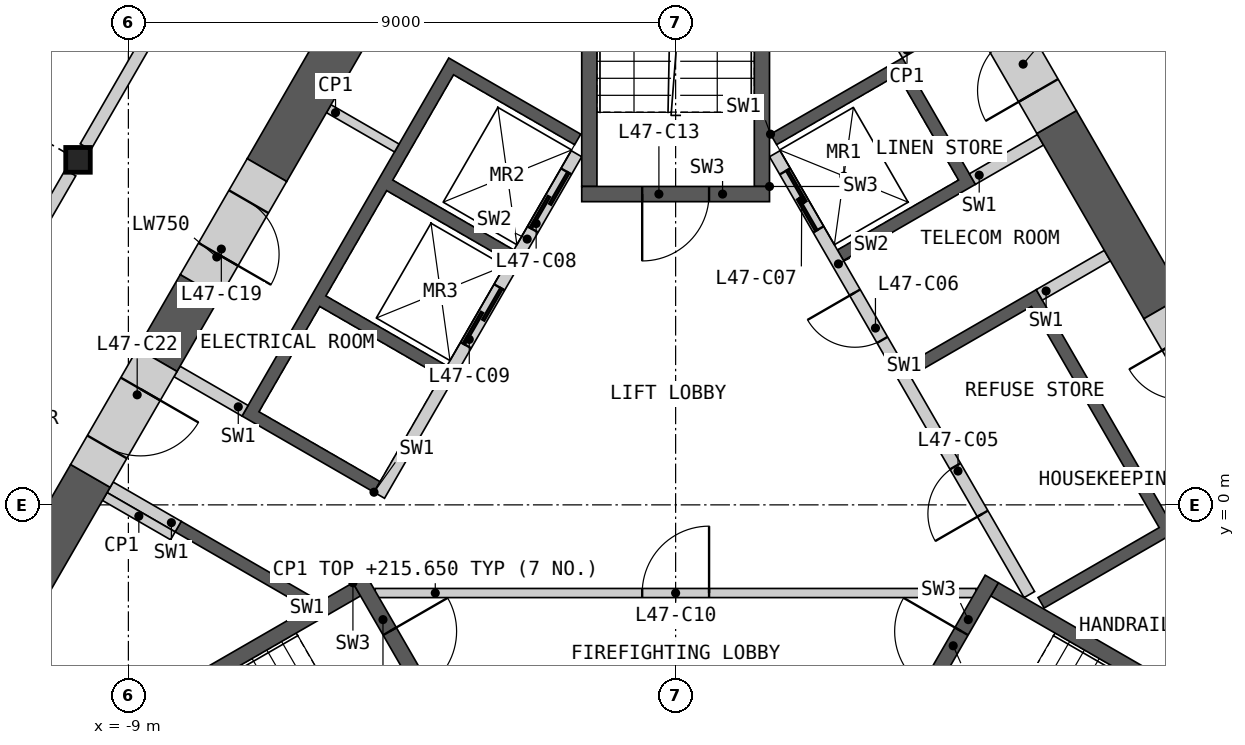
"""IFC4 building model, lengths in metres.
Left out: names, types, materials, properties, quantities, classifications, styles, units other than length and angle.
Written with IfcOpenShell. Run it as: python <this file> out.ifc"""

import sys

from ifc_helpers import new_model, si_unit, direction, frame, frame_2d, origin, origin_2d, place, context, subcontext, project, spatial, polyline, rectangle, i_section, outline, extrude, element, fill, save


model = new_model("IFC4")
c1 = context("Model", 3, precision=1e-05, world=origin(), true_north=direction((0.0, 1.0)))
c2 = subcontext(c1, "Body", "Model", "MODEL_VIEW")
j1 = project(units=[si_unit("LENGTHUNIT", "METRE"), si_unit("PLANEANGLEUNIT", "RADIAN")], contexts=[c1])
p1 = place(None, origin())
s1 = spatial("IfcSite", under=j1, at=p1, CompositionType="ELEMENT")
p2 = place(p1, origin())
s2 = spatial("IfcBuilding", under=s1, at=p2, CompositionType="ELEMENT")
p3 = place(p2, frame((0.0, 0.0, 212.4)))
s3 = spatial("IfcBuildingStorey", under=s2, at=p3, CompositionType="ELEMENT", Elevation=212.4)
p4 = place(p3, frame((-9.828, 5.675, 0.0), z_axis=(0.0, 0.0, 1.0), x_axis=(1.0, 0.0, 0.0)))
e1 = element("IfcColumn", 1, at=p4, inside=s3, PredefinedType="COLUMN", context=c2, shape_type="SweptSolid", body=[
    extrude(i_section(OverallWidth=0.404, OverallDepth=0.407, WebThickness=0.027, FlangeThickness=0.044, at=origin_2d()), origin(), (0.0, 0.0, 1.0), 3.6),
])
p5 = place(p3, origin())
e2 = element("IfcWall", 2, at=p5, inside=s3, PredefinedType="SHEAR", context=c2, shape_type="SweptSolid", body=[
    extrude(outline(polyline([(1.561, 6.097), (3.731, 7.35), (4.931, 5.272), (2.76, 4.019), (2.66, 4.192), (4.652, 5.342), (3.652, 7.074), (1.66, 5.924), (1.561, 6.097)])), origin(), (0.0, 0.0, 1.0), 3.25),
])
p6 = place(p3, origin())
e3 = element("IfcWall", 3, at=p6, inside=s3, PredefinedType="SHEAR", context=c2, shape_type="SweptSolid", body=[
    extrude(outline(polyline([(3.76, 2.287), (5.931, 3.54), (8.231, -0.444), (6.061, -1.697), (5.96, -1.524), (7.952, -0.374), (5.852, 3.263), (3.861, 2.113), (3.76, 2.287)])), origin(), (0.0, 0.0, 1.0), 3.25),
])
p7 = place(p3, frame((5.817, -1.476, 0.0), z_axis=(0.0, 0.0, 1.0), x_axis=(-0.500002616675, 0.866023893041, 0.0)))
e4 = element("IfcWall", 4, at=p7, inside=s3, PredefinedType="SOLIDWALL", context=c2, shape_type="SweptSolid", body=[
    extrude(rectangle(XDim=8.373, YDim=0.2, at=frame_2d((4.187, 0.0))), origin(), (0.0, 0.0, 1.0), 3.25),
])
p8 = place(p7, frame((1.537, 0.0, 0.0)))
e5 = element("IfcOpeningElement", 5, at=p8, cuts=e4, PredefinedType="OPENING", context=c2, shape_type="SweptSolid", body=[
    extrude(rectangle(XDim=0.9, YDim=2.1, at=frame_2d((0.45, 1.05))), frame((0.0, 0.11, 0.0), z_axis=(0.0, -1.0, 0.0), x_axis=(1.0, 0.0, 0.0)), (0.0, 0.0, 1.0), 0.22),
])
p9 = place(p7, frame((4.837, 0.0, 0.0)))
e6 = element("IfcOpeningElement", 6, at=p9, cuts=e4, PredefinedType="OPENING", context=c2, shape_type="SweptSolid", body=[
    extrude(rectangle(XDim=0.9, YDim=2.1, at=frame_2d((0.45, 1.05))), frame((0.0, 0.11, 0.0), z_axis=(0.0, -1.0, 0.0), x_axis=(1.0, 0.0, 0.0)), (0.0, 0.0, 1.0), 0.22),
])
p10 = place(p7, frame((6.937, 0.0, 0.0)))
e7 = element("IfcOpeningElement", 7, at=p10, cuts=e4, PredefinedType="OPENING", context=c2, shape_type="SweptSolid", body=[
    extrude(rectangle(XDim=1.1, YDim=2.1, at=frame_2d((0.55, 1.05))), frame((0.0, 0.11, 0.0), z_axis=(0.0, -1.0, 0.0), x_axis=(1.0, 0.0, 0.0)), (0.0, 0.0, 1.0), 0.22),
])
p11 = place(p3, frame((5.981, 3.453, 0.0), z_axis=(0.0, 0.0, 1.0), x_axis=(0.865968639725, 0.500098305348, 0.0)))
e8 = element("IfcWall", 8, at=p11, inside=s3, PredefinedType="SHEAR", context=c2, shape_type="SweptSolid", body=[
    extrude(rectangle(XDim=1.293, YDim=0.2, at=frame_2d((0.646, 0.0))), origin(), (0.0, 0.0, 1.0), 3.25),
])
p12 = place(p3, frame((4.881, 5.358, 0.0), z_axis=(0.0, 0.0, 1.0), x_axis=(0.866084958089, 0.499896834728, 0.0)))
e9 = element("IfcWall", 9, at=p12, inside=s3, PredefinedType="SHEAR", context=c2, shape_type="SweptSolid", body=[
    extrude(rectangle(XDim=1.293, YDim=0.2, at=frame_2d((0.646, 0.0))), origin(), (0.0, 0.0, 1.0), 3.25),
])
p13 = place(p3, origin())
e10 = element("IfcWall", 10, at=p13, inside=s3, PredefinedType="SHEAR", context=c2, shape_type="SweptSolid", body=[
    extrude(outline(polyline([(-6.061, -1.697), (-8.231, -0.444), (-8.131, -0.271), (-5.96, -1.524), (-6.061, -1.697)])), origin(), (0.0, 0.0, 1.0), 3.25),
])
p14 = place(p3, origin())
e11 = element("IfcWall", 11, at=p14, inside=s3, PredefinedType="SHEAR", context=c2, shape_type="SweptSolid", body=[
    extrude(outline(polyline([(-4.96, 0.208), (-7.131, 1.461), (-3.731, 7.35), (-1.561, 6.097), (-1.66, 5.924), (-3.652, 7.074), (-4.652, 5.342), (-2.66, 4.192), (-2.76, 4.019), (-4.752, 5.169), (-5.752, 3.437), (-3.76, 2.287), (-3.861, 2.113), (-5.852, 3.263), (-6.852, 1.531), (-4.861, 0.381), (-4.96, 0.208)])), origin(), (0.0, 0.0, 1.0), 3.25),
])
p15 = place(p3, frame((-1.631, 5.776, 0.0), z_axis=(0.0, 0.0, 1.0), x_axis=(-0.499992876559, -0.866029516466, 0.0)))
e12 = element("IfcWall", 12, at=p15, inside=s3, PredefinedType="SOLIDWALL", context=c2, shape_type="SweptSolid", body=[
    extrude(rectangle(XDim=6.486, YDim=0.2, at=frame_2d((3.243, 0.0))), origin(), (0.0, 0.0, 1.0), 3.25),
])
p16 = place(p15, frame((0.337, 0.0, 0.0)))
e13 = element("IfcOpeningElement", 13, at=p16, cuts=e12, PredefinedType="OPENING", context=c2, shape_type="SweptSolid", body=[
    extrude(rectangle(XDim=1.1, YDim=2.1, at=frame_2d((0.55, 1.05))), frame((0.0, 0.11, 0.0), z_axis=(0.0, -1.0, 0.0), x_axis=(1.0, 0.0, 0.0)), (0.0, 0.0, 1.0), 0.22),
])
p17 = place(p15, frame((2.537, 0.0, 0.0)))
e14 = element("IfcOpeningElement", 14, at=p17, cuts=e12, PredefinedType="OPENING", context=c2, shape_type="SweptSolid", body=[
    extrude(rectangle(XDim=1.1, YDim=2.1, at=frame_2d((0.55, 1.05))), frame((0.0, 0.11, 0.0), z_axis=(0.0, -1.0, 0.0), x_axis=(1.0, 0.0, 0.0)), (0.0, 0.0, 1.0), 0.22),
])
for number, where, z_axis, x_axis in (
    (15, (-7.081, 1.548, 0.0), (0.0, 0.0, 1.0), (-0.866, 0.5, 0.0)),
    (16, (-8.181, -0.357, 0.0), (0.0, 0.0, 1.0), (-0.866, 0.5, 0.0)),
):
    element("IfcWall", number, at=place(p3, frame(where, z_axis=z_axis, x_axis=x_axis)), inside=s3, PredefinedType="SHEAR", context=c2, shape_type="SweptSolid", body=[
        extrude(rectangle(XDim=1.293, YDim=0.2, at=frame_2d((0.646, 0.0))), origin(), (0.0, 0.0, 1.0), 3.25),
    ])
p18 = place(p3, frame((-4.941, -1.45, 0.0), z_axis=(0.0, 0.0, 1.0), x_axis=(1.0, 0.0, 0.0)))
e17 = element("IfcWall", 17, at=p18, inside=s3, PredefinedType="PARTITIONING", context=c2, shape_type="SweptSolid", body=[
    extrude(rectangle(XDim=9.882, YDim=0.15, at=frame_2d((4.941, 0.0))), origin(), (0.0, 0.0, 1.0), 3.25),
])
p19 = place(p18, frame((4.391, 0.0, 0.0)))
e18 = element("IfcOpeningElement", 18, at=p19, cuts=e17, PredefinedType="OPENING", context=c2, shape_type="SweptSolid", body=[
    extrude(rectangle(XDim=1.1, YDim=2.1, at=frame_2d((0.55, 1.05))), frame((0.0, 0.085, 0.0), z_axis=(0.0, -1.0, 0.0), x_axis=(1.0, 0.0, 0.0)), (0.0, 0.0, 1.0), 0.17),
])
p20 = place(p3, origin())
e19 = element("IfcWall", 19, at=p20, inside=s3, PredefinedType="SHEAR", context=c2, shape_type="SweptSolid", body=[
    extrude(outline(polyline([(-5.307, -1.281), (-10.374, -4.206), (-10.032, -4.298), (-5.182, -1.498), (-5.307, -1.281)])), origin(), (0.0, 0.0, 1.0), 3.25),
])
p21 = place(p3, frame((-5.199, -1.219, 0.0), z_axis=(0.0, 0.0, 1.0), x_axis=(0.499982516597, -0.866035497597, 0.0)))
e20 = element("IfcWall", 20, at=p21, inside=s3, PredefinedType="SHEAR", context=c2, shape_type="SweptSolid", body=[
    extrude(rectangle(XDim=3.088, YDim=0.25, at=frame_2d((1.544, 0.0))), origin(), (0.0, 0.0, 1.0), 3.25),
])
p22 = place(p21, frame((0.994, 0.0, 0.0)))
e21 = element("IfcOpeningElement", 21, at=p22, cuts=e20, PredefinedType="OPENING", context=c2, shape_type="SweptSolid", body=[
    extrude(rectangle(XDim=1.1, YDim=2.1, at=frame_2d((0.55, 1.05))), frame((0.0, 0.135, 0.0), z_axis=(0.0, -1.0, 0.0), x_axis=(1.0, 0.0, 0.0)), (0.0, 0.0, 1.0), 0.27),
])
p23 = place(p3, origin())
e22 = element("IfcWall", 22, at=p23, inside=s3, PredefinedType="SHEAR", context=c2, shape_type="SweptSolid", body=[
    extrude(outline(polyline([(10.032, -4.298), (10.374, -4.206), (5.307, -1.281), (5.182, -1.498), (10.032, -4.298)])), origin(), (0.0, 0.0, 1.0), 3.25),
])
p24 = place(p3, frame((3.655, -3.893, 0.0), z_axis=(0.0, 0.0, 1.0), x_axis=(0.499982516597, 0.866035497597, 0.0)))
e23 = element("IfcWall", 23, at=p24, inside=s3, PredefinedType="SHEAR", context=c2, shape_type="SweptSolid", body=[
    extrude(rectangle(XDim=3.088, YDim=0.25, at=frame_2d((1.544, 0.0))), origin(), (0.0, 0.0, 1.0), 3.25),
])
p25 = place(p24, frame((0.994, 0.0, 0.0)))
e24 = element("IfcOpeningElement", 24, at=p25, cuts=e23, PredefinedType="OPENING", context=c2, shape_type="SweptSolid", body=[
    extrude(rectangle(XDim=1.1, YDim=2.1, at=frame_2d((0.55, 1.05))), frame((0.0, 0.135, 0.0), z_axis=(0.0, -1.0, 0.0), x_axis=(1.0, 0.0, 0.0)), (0.0, 0.0, 1.0), 0.27),
])
p26 = place(p3, origin())
e25 = element("IfcWall", 25, at=p26, inside=s3, PredefinedType="SHEAR", context=c2, shape_type="SweptSolid", body=[
    extrude(outline(polyline([(1.544, 5.237), (1.544, 11.087), (1.294, 10.837), (1.294, 5.237), (1.544, 5.237)])), origin(), (0.0, 0.0, 1.0), 3.25),
])
p27 = place(p3, origin())
e26 = element("IfcWall", 26, at=p27, inside=s3, PredefinedType="SHEAR", context=c2, shape_type="SweptSolid", body=[
    extrude(outline(polyline([(-1.294, 10.837), (-1.544, 11.087), (-1.544, 5.237), (-1.294, 5.237), (-1.294, 10.837)])), origin(), (0.0, 0.0, 1.0), 3.25),
])
p28 = place(p3, frame((1.544, 5.112, 0.0), z_axis=(0.0, 0.0, 1.0), x_axis=(-1.0, 0.0, 0.0)))
e27 = element("IfcWall", 27, at=p28, inside=s3, PredefinedType="SHEAR", context=c2, shape_type="SweptSolid", body=[
    extrude(rectangle(XDim=3.088, YDim=0.25, at=frame_2d((1.544, 0.0))), origin(), (0.0, 0.0, 1.0), 3.25),
])
p29 = place(p28, frame((0.994, 0.0, 0.0)))
e28 = element("IfcOpeningElement", 28, at=p29, cuts=e27, PredefinedType="OPENING", context=c2, shape_type="SweptSolid", body=[
    extrude(rectangle(XDim=1.1, YDim=2.1, at=frame_2d((0.55, 1.05))), frame((0.0, 0.135, 0.0), z_axis=(0.0, -1.0, 0.0), x_axis=(1.0, 0.0, 0.0)), (0.0, 0.0, 1.0), 0.27),
])
for number, where, z_axis, x_axis in (
    (29, (3.693, 7.415, 0.0), (0.0, 0.0, 1.0), (0.866, 0.5, 0.0)),
    (30, (-8.268, -0.509, 0.0), (0.0, 0.0, 1.0), (-0.866, 0.5, 0.0)),
    (31, (-5.705, 6.516, 0.0), (0.0, 0.0, 1.0), (0.866, -0.5, 0.0)),
):
    element("IfcWall", number, at=place(p3, frame(where, z_axis=z_axis, x_axis=x_axis)), inside=s3, PredefinedType="PARTITIONING", context=c2, shape_type="SweptSolid", body=[
        extrude(rectangle(XDim=1.293, YDim=0.15, at=frame_2d((0.646, 0.0))), origin(), (0.0, 0.0, 1.0), 3.25),
    ])
p30 = place(p3, frame((8.025, 3.248, 0.0), z_axis=(0.0, 0.0, 1.0), x_axis=(-0.499958618571, 0.866049294045, 0.0)))
e32 = element("IfcWall", 32, at=p30, inside=s3, PredefinedType="SHEAR", context=c2, shape_type="SweptSolid", body=[
    extrude(rectangle(XDim=3.52, YDim=0.75, at=frame_2d((1.76, 0.0))), origin(), (0.0, 0.0, 1.0), 3.25),
])
p31 = place(p3, frame((-9.625, 0.477, 0.0), z_axis=(0.0, 0.0, 1.0), x_axis=(-0.499986234705, -0.866033351035, 0.0)))
e33 = element("IfcWall", 33, at=p31, inside=s3, PredefinedType="SHEAR", context=c2, shape_type="SweptSolid", body=[
    extrude(rectangle(XDim=9.801, YDim=0.75, at=frame_2d((4.9, 0.0))), origin(), (0.0, 0.0, 1.0), 3.25),
])
p32 = place(p3, frame((-3.708, 10.724, 0.0), z_axis=(0.0, 0.0, 1.0), x_axis=(-0.500021737671, -0.866012853171, 0.0)))
e34 = element("IfcWall", 34, at=p32, inside=s3, PredefinedType="SHEAR", context=c2, shape_type="SweptSolid", body=[
    extrude(rectangle(XDim=6.026, YDim=0.75, at=frame_2d((3.013, 0.0))), origin(), (0.0, 0.0, 1.0), 3.25),
])
p33 = place(p3, frame((-7.821, 3.601, 0.0), z_axis=(0.0, 0.0, 1.0), x_axis=(-0.49996263964, -0.866046972724, 0.0)))
e35 = element("IfcWall", 35, at=p33, inside=s3, PredefinedType="SHEAR", context=c2, shape_type="SweptSolid", body=[
    extrude(rectangle(XDim=1.408, YDim=0.75, at=frame_2d((0.704, 0.0))), origin(), (0.0, 0.0, 1.0), 3.25),
])
p34 = place(p3, frame((9.125, 1.343, 0.0), z_axis=(0.0, 0.0, 1.0), x_axis=(-0.499946605688, 0.86605622881, 0.0)))
e36 = element("IfcWall", 36, at=p34, inside=s3, PredefinedType="SHEAR", context=c2, shape_type="SweptSolid", body=[
    extrude(rectangle(XDim=2.2, YDim=0.75, at=frame_2d((1.1, 0.0))), origin(), (0.0, 0.0, 1.0), 3.25),
])
p35 = place(p34, frame((0.6, 0.0, 0.0)))
e37 = element("IfcOpeningElement", 37, at=p35, cuts=e36, PredefinedType="OPENING", context=c2, shape_type="SweptSolid", body=[
    extrude(rectangle(XDim=1.0, YDim=2.1, at=frame_2d((0.5, 1.05))), frame((0.0, 0.385, 0.0), z_axis=(0.0, -1.0, 0.0), x_axis=(1.0, 0.0, 0.0)), (0.0, 0.0, 1.0), 0.77),
])
p36 = place(p3, frame((-6.721, 5.506, 0.0), z_axis=(0.0, 0.0, 1.0), x_axis=(-0.499946605688, -0.86605622881, 0.0)))
e38 = element("IfcWall", 38, at=p36, inside=s3, PredefinedType="SHEAR", context=c2, shape_type="SweptSolid", body=[
    extrude(rectangle(XDim=2.2, YDim=0.75, at=frame_2d((1.1, 0.0))), origin(), (0.0, 0.0, 1.0), 3.25),
])
p37 = place(p36, frame((0.6, 0.0, 0.0)))
e39 = element("IfcOpeningElement", 39, at=p37, cuts=e38, PredefinedType="OPENING", context=c2, shape_type="SweptSolid", body=[
    extrude(rectangle(XDim=1.0, YDim=2.1, at=frame_2d((0.5, 1.05))), frame((0.0, 0.385, 0.0), z_axis=(0.0, -1.0, 0.0), x_axis=(1.0, 0.0, 0.0)), (0.0, 0.0, 1.0), 0.77),
])
p38 = place(p3, frame((6.265, 6.296, 0.0), z_axis=(0.0, 0.0, 1.0), x_axis=(-0.500029011134, 0.866008653551, 0.0)))
e40 = element("IfcWall", 40, at=p38, inside=s3, PredefinedType="SHEAR", context=c2, shape_type="SweptSolid", body=[
    extrude(rectangle(XDim=2.16, YDim=0.75, at=frame_2d((1.08, 0.0))), origin(), (0.0, 0.0, 1.0), 3.25),
])
p39 = place(p38, frame((0.6, 0.0, 0.0)))
e41 = element("IfcOpeningElement", 41, at=p39, cuts=e40, PredefinedType="OPENING", context=c2, shape_type="SweptSolid", body=[
    extrude(rectangle(XDim=1.0, YDim=2.1, at=frame_2d((0.5, 1.05))), frame((0.0, 0.385, 0.0), z_axis=(0.0, -1.0, 0.0), x_axis=(1.0, 0.0, 0.0)), (0.0, 0.0, 1.0), 0.77),
])
p40 = place(p3, frame((-8.525, 2.382, 0.0), z_axis=(0.0, 0.0, 1.0), x_axis=(-0.500077893725, -0.86598042715, 0.0)))
e42 = element("IfcWall", 42, at=p40, inside=s3, PredefinedType="SHEAR", context=c2, shape_type="SweptSolid", body=[
    extrude(rectangle(XDim=2.2, YDim=0.75, at=frame_2d((1.1, 0.0))), origin(), (0.0, 0.0, 1.0), 3.25),
])
p41 = place(p40, frame((0.55, 0.0, 0.0)))
e43 = element("IfcOpeningElement", 43, at=p41, cuts=e42, PredefinedType="OPENING", context=c2, shape_type="SweptSolid", body=[
    extrude(rectangle(XDim=1.1, YDim=2.1, at=frame_2d((0.55, 1.05))), frame((0.0, 0.385, 0.0), z_axis=(0.0, -1.0, 0.0), x_axis=(1.0, 0.0, 0.0)), (0.0, 0.0, 1.0), 0.77),
])
p42 = place(p3, frame((5.377, 19.385, 0.0), z_axis=(0.0, 0.0, 1.0), x_axis=(0.500000757641, -0.86602496636, 0.0)))
e44 = element("IfcWall", 44, at=p42, inside=s3, PredefinedType="PARTITIONING", context=c2, shape_type="SweptSolid", body=[
    extrude(rectangle(XDim=28.198, YDim=0.2, at=frame_2d((14.099, 0.0))), origin(), (0.0, 0.0, 1.0), 3.25),
])
p43 = place(p42, frame((25.345, 0.0, 0.0)))
e45 = element("IfcOpeningElement", 45, at=p43, cuts=e44, PredefinedType="OPENING", context=c2, shape_type="SweptSolid", body=[
    extrude(rectangle(XDim=1.8, YDim=2.1, at=frame_2d((0.9, 1.05))), frame((0.0, 0.11, 0.0), z_axis=(0.0, -1.0, 0.0), x_axis=(1.0, 0.0, 0.0)), (0.0, 0.0, 1.0), 0.22),
])
p44 = place(p42, frame((19.621, 0.0, 0.0)))
e46 = element("IfcOpeningElement", 46, at=p44, cuts=e44, PredefinedType="OPENING", context=c2, shape_type="SweptSolid", body=[
    extrude(rectangle(XDim=1.0, YDim=2.1, at=frame_2d((0.5, 1.05))), frame((0.0, 0.11, 0.0), z_axis=(0.0, -1.0, 0.0), x_axis=(1.0, 0.0, 0.0)), (0.0, 0.0, 1.0), 0.22),
])
p45 = place(p42, frame((16.409, 0.0, 0.0)))
e47 = element("IfcOpeningElement", 47, at=p45, cuts=e44, PredefinedType="OPENING", context=c2, shape_type="SweptSolid", body=[
    extrude(rectangle(XDim=1.1, YDim=2.1, at=frame_2d((0.55, 1.05))), frame((0.0, 0.11, 0.0), z_axis=(0.0, -1.0, 0.0), x_axis=(1.0, 0.0, 0.0)), (0.0, 0.0, 1.0), 0.22),
])
p46 = place(p42, frame((1.452, 0.0, 0.0)))
e48 = element("IfcOpeningElement", 48, at=p46, cuts=e44, PredefinedType="OPENING", context=c2, shape_type="SweptSolid", body=[
    extrude(rectangle(XDim=0.95, YDim=2.1, at=frame_2d((0.475, 1.05))), frame((0.0, 0.11, 0.0), z_axis=(0.0, -1.0, 0.0), x_axis=(1.0, 0.0, 0.0)), (0.0, 0.0, 1.0), 0.22),
])
p47 = place(p3, frame((-9.705, 5.888, 0.0), z_axis=(0.0, 0.0, 1.0), x_axis=(0.50000393355, 0.866023132736, 0.0)))
e49 = element("IfcWall", 49, at=p47, inside=s3, PredefinedType="PARTITIONING", context=c2, shape_type="SweptSolid", body=[
    extrude(rectangle(XDim=9.335, YDim=0.2, at=frame_2d((4.667, 0.0))), origin(), (0.0, 0.0, 1.0), 3.25),
])
p48 = place(p47, frame((3.465, 0.0, 0.0)))
e50 = element("IfcOpeningElement", 50, at=p48, cuts=e49, PredefinedType="OPENING", context=c2, shape_type="SweptSolid", body=[
    extrude(rectangle(XDim=1.1, YDim=2.1, at=frame_2d((0.55, 1.05))), frame((0.0, 0.11, 0.0), z_axis=(0.0, -1.0, 0.0), x_axis=(1.0, 0.0, 0.0)), (0.0, 0.0, 1.0), 0.22),
])
p49 = place(p3, frame((-14.619, -2.624, 0.0), z_axis=(0.0, 0.0, 1.0), x_axis=(0.50000393355, 0.866023132736, 0.0)))
e51 = element("IfcWall", 51, at=p49, inside=s3, PredefinedType="PARTITIONING", context=c2, shape_type="SweptSolid", body=[
    extrude(rectangle(XDim=9.335, YDim=0.2, at=frame_2d((4.667, 0.0))), origin(), (0.0, 0.0, 1.0), 3.25),
])
p50 = place(p49, frame((3.062, 0.0, 0.0)))
e52 = element("IfcOpeningElement", 52, at=p50, cuts=e51, PredefinedType="OPENING", context=c2, shape_type="SweptSolid", body=[
    extrude(rectangle(XDim=1.0, YDim=2.1, at=frame_2d((0.5, 1.05))), frame((0.0, 0.11, 0.0), z_axis=(0.0, -1.0, 0.0), x_axis=(1.0, 0.0, 0.0)), (0.0, 0.0, 1.0), 0.22),
])
p51 = place(p8, origin())
e53 = element("IfcDoor", 53, at=p51, inside=s3, OperationType="SINGLE_SWING_LEFT", PredefinedType="DOOR", context=c2, shape_type="SweptSolid", body=[
    extrude(rectangle(XDim=0.9, YDim=2.1, at=frame_2d((0.45, 1.05))), frame((0.0, 0.025, 0.0), z_axis=(0.0, -1.0, 0.0), x_axis=(1.0, 0.0, 0.0)), (0.0, 0.0, 1.0), 0.05),
])
fill(e5, e53)
p52 = place(p9, origin())
e54 = element("IfcDoor", 54, at=p52, inside=s3, OperationType="SINGLE_SWING_RIGHT", PredefinedType="DOOR", context=c2, shape_type="SweptSolid", body=[
    extrude(rectangle(XDim=0.9, YDim=2.1, at=frame_2d((0.45, 1.05))), frame((0.0, 0.025, 0.0), z_axis=(0.0, -1.0, 0.0), x_axis=(1.0, 0.0, 0.0)), (0.0, 0.0, 1.0), 0.05),
])
fill(e6, e54)
p53 = place(p10, origin())
e55 = element("IfcDoor", 55, at=p53, inside=s3, OperationType="SLIDING_TO_LEFT", PredefinedType="DOOR", context=c2, shape_type="SweptSolid", body=[
    extrude(rectangle(XDim=1.1, YDim=2.1, at=frame_2d((0.55, 1.05))), frame((0.0, 0.025, 0.0), z_axis=(0.0, -1.0, 0.0), x_axis=(1.0, 0.0, 0.0)), (0.0, 0.0, 1.0), 0.05),
])
fill(e7, e55)
p54 = place(p16, origin())
e56 = element("IfcDoor", 56, at=p54, inside=s3, OperationType="SLIDING_TO_LEFT", PredefinedType="DOOR", context=c2, shape_type="SweptSolid", body=[
    extrude(rectangle(XDim=1.1, YDim=2.1, at=frame_2d((0.55, 1.05))), frame((0.0, 0.025, 0.0), z_axis=(0.0, -1.0, 0.0), x_axis=(1.0, 0.0, 0.0)), (0.0, 0.0, 1.0), 0.05),
])
fill(e13, e56)
p55 = place(p17, origin())
e57 = element("IfcDoor", 57, at=p55, inside=s3, OperationType="SLIDING_TO_LEFT", PredefinedType="DOOR", context=c2, shape_type="SweptSolid", body=[
    extrude(rectangle(XDim=1.1, YDim=2.1, at=frame_2d((0.55, 1.05))), frame((0.0, 0.025, 0.0), z_axis=(0.0, -1.0, 0.0), x_axis=(1.0, 0.0, 0.0)), (0.0, 0.0, 1.0), 0.05),
])
fill(e14, e57)
p56 = place(p19, origin())
e58 = element("IfcDoor", 58, at=p56, inside=s3, OperationType="SINGLE_SWING_RIGHT", PredefinedType="DOOR", context=c2, shape_type="SweptSolid", body=[
    extrude(rectangle(XDim=1.1, YDim=2.1, at=frame_2d((0.55, 1.05))), frame((0.0, 0.025, 0.0), z_axis=(0.0, -1.0, 0.0), x_axis=(1.0, 0.0, 0.0)), (0.0, 0.0, 1.0), 0.05),
])
fill(e18, e58)
p57 = place(p22, origin())
e59 = element("IfcDoor", 59, at=p57, inside=s3, OperationType="SINGLE_SWING_LEFT", PredefinedType="DOOR", context=c2, shape_type="SweptSolid", body=[
    extrude(rectangle(XDim=1.1, YDim=2.1, at=frame_2d((0.55, 1.05))), frame((0.0, 0.025, 0.0), z_axis=(0.0, -1.0, 0.0), x_axis=(1.0, 0.0, 0.0)), (0.0, 0.0, 1.0), 0.05),
])
fill(e21, e59)
p58 = place(p25, origin())
e60 = element("IfcDoor", 60, at=p58, inside=s3, OperationType="SINGLE_SWING_RIGHT", PredefinedType="DOOR", context=c2, shape_type="SweptSolid", body=[
    extrude(rectangle(XDim=1.1, YDim=2.1, at=frame_2d((0.55, 1.05))), frame((0.0, 0.025, 0.0), z_axis=(0.0, -1.0, 0.0), x_axis=(1.0, 0.0, 0.0)), (0.0, 0.0, 1.0), 0.05),
])
fill(e24, e60)
p59 = place(p29, origin())
e61 = element("IfcDoor", 61, at=p59, inside=s3, OperationType="SINGLE_SWING_RIGHT", PredefinedType="DOOR", context=c2, shape_type="SweptSolid", body=[
    extrude(rectangle(XDim=1.1, YDim=2.1, at=frame_2d((0.55, 1.05))), frame((0.0, 0.025, 0.0), z_axis=(0.0, -1.0, 0.0), x_axis=(1.0, 0.0, 0.0)), (0.0, 0.0, 1.0), 0.05),
])
fill(e28, e61)
p60 = place(p37, origin())
e62 = element("IfcDoor", 62, at=p60, inside=s3, OperationType="SINGLE_SWING_RIGHT", PredefinedType="DOOR", context=c2, shape_type="SweptSolid", body=[
    extrude(rectangle(XDim=1.0, YDim=2.1, at=frame_2d((0.5, 1.05))), frame((0.0, 0.13, 0.0), z_axis=(0.0, -1.0, 0.0), x_axis=(1.0, 0.0, 0.0)), (0.0, 0.0, 1.0), 0.05),
])
fill(e39, e62)
p61 = place(p39, origin())
e63 = element("IfcDoor", 63, at=p61, inside=s3, OperationType="SINGLE_SWING_LEFT", PredefinedType="DOOR", context=c2, shape_type="SweptSolid", body=[
    extrude(rectangle(XDim=1.0, YDim=2.1, at=frame_2d((0.5, 1.05))), frame((0.0, 0.13, 0.0), z_axis=(0.0, -1.0, 0.0), x_axis=(1.0, 0.0, 0.0)), (0.0, 0.0, 1.0), 0.05),
])
fill(e41, e63)
p62 = place(p41, origin())
e64 = element("IfcDoor", 64, at=p62, inside=s3, OperationType="SINGLE_SWING_LEFT", PredefinedType="DOOR", context=c2, shape_type="SweptSolid", body=[
    extrude(rectangle(XDim=1.1, YDim=2.1, at=frame_2d((0.55, 1.05))), frame((0.0, 0.13, 0.0), z_axis=(0.0, -1.0, 0.0), x_axis=(1.0, 0.0, 0.0)), (0.0, 0.0, 1.0), 0.05),
])
fill(e43, e64)
save(model, sys.argv[1])
